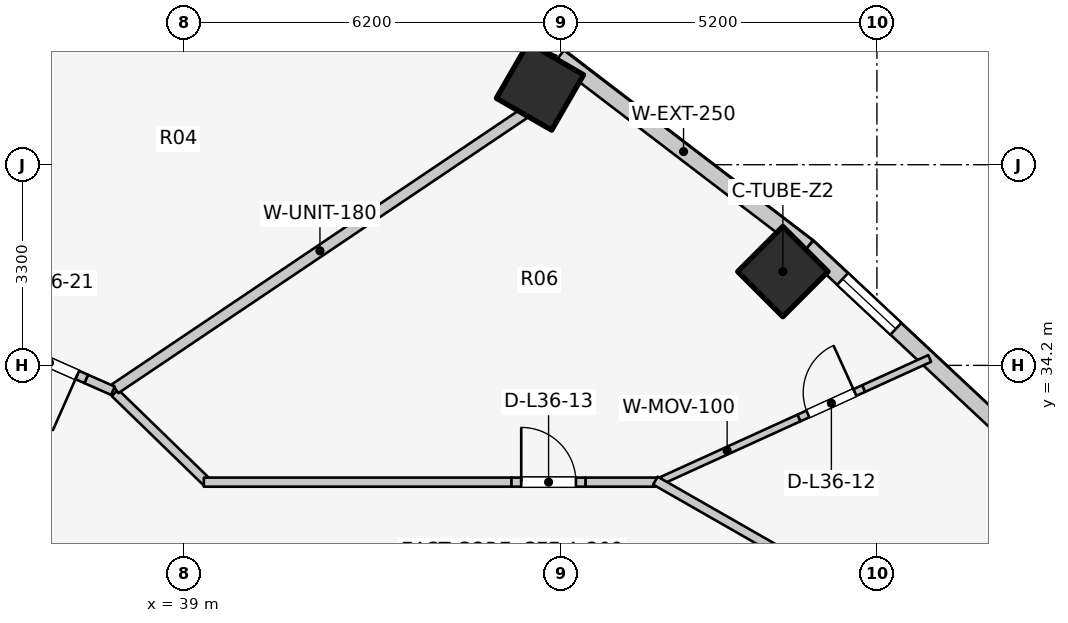
"""IFC4 building model, lengths in metres.
Left out: names, types, materials, properties, quantities, classifications, styles, units other than length and angle.
Written with IfcOpenShell. Run it as: python <this file> out.ifc"""

import sys

from ifc_helpers import new_model, si_unit, direction, frame, frame_2d, origin, origin_2d, place, context, subcontext, project, spatial, rectangle, extrude, element, fill, save


model = new_model("IFC4")
c1 = context("Model", 3, precision=1e-05, world=origin(), true_north=direction((0.0, 1.0)))
c2 = subcontext(c1, "Body", "Model", "MODEL_VIEW")
j1 = project(units=[si_unit("LENGTHUNIT", "METRE"), si_unit("PLANEANGLEUNIT", "RADIAN")], contexts=[c1])
p1 = place(None, origin())
s1 = spatial("IfcSite", under=j1, at=p1, CompositionType="ELEMENT")
p2 = place(p1, origin())
s2 = spatial("IfcBuilding", under=s1, at=p2, CompositionType="ELEMENT")
p3 = place(p2, frame((0.0, 0.0, 119.7)))
s3 = spatial("IfcBuildingStorey", under=s2, at=p3, CompositionType="ELEMENT", Elevation=119.7)
for number, where, z_axis, x_axis in (
    (1, (48.853, 35.743, 0.0), (0.0, 0.0, 1.0), (0.707, 0.707, 0.0)),
    (2, (44.858, 38.786, 0.0), (0.0, 0.0, 1.0), (0.5, 0.866, 0.0)),
):
    element("IfcColumn", number, at=place(p3, frame(where, z_axis=z_axis, x_axis=x_axis)), inside=s3, PredefinedType="COLUMN", context=c2, shape_type="SweptSolid", body=[
        extrude(rectangle(XDim=1.05, YDim=1.05, at=origin_2d()), origin(), (0.0, 0.0, 1.0), 3.1),
    ])
p4 = place(p3, frame((52.821, 32.827, 0.0), z_axis=(0.0, 0.0, 1.0), x_axis=(-0.730162452258, 0.68327358599, 0.0)))
e3 = element("IfcWall", 3, at=p4, inside=s3, PredefinedType="STANDARD", context=c2, shape_type="SweptSolid", body=[
    extrude(rectangle(XDim=4.868, YDim=0.26, at=frame_2d((2.434, 0.0))), origin(), (0.0, 0.0, 1.0), 1.22),
])
p5 = place(p4, frame((2.889, 0.0, 0.15)))
e4 = element("IfcOpeningElement", 4, at=p5, cuts=e3, PredefinedType="OPENING", context=c2, shape_type="SweptSolid", body=[
    extrude(rectangle(XDim=1.2, YDim=0.9, at=frame_2d((0.6, 0.45))), frame((0.0, 0.14, 0.0), z_axis=(0.0, -1.0, 0.0), x_axis=(1.0, 0.0, 0.0)), (0.0, 0.0, 1.0), 0.28),
])
p6 = place(p3, frame((49.266, 36.153, 0.0), z_axis=(0.0, 0.0, 1.0), x_axis=(-0.794809810864, 0.606858603427, 0.0)))
e5 = element("IfcWall", 5, at=p6, inside=s3, PredefinedType="STANDARD", context=c2, shape_type="SweptSolid", body=[
    extrude(rectangle(XDim=5.149, YDim=0.26, at=frame_2d((2.575, 0.0))), origin(), (0.0, 0.0, 1.0), 1.22),
])
p7 = place(p3, frame((46.754, 32.259, 0.0), z_axis=(0.0, 0.0, 1.0), x_axis=(0.910131348923, 0.414319837453, 0.0)))
e6 = element("IfcWall", 6, at=p7, inside=s3, PredefinedType="MOVABLE", context=c2, shape_type="SweptSolid", body=[
    extrude(rectangle(XDim=2.597, YDim=0.12, at=frame_2d((1.299, 0.0))), origin(), (0.0, 0.0, 1.0), 1.22),
])
p8 = place(p3, frame((49.118, 33.335, 0.0), z_axis=(0.0, 0.0, 1.0), x_axis=(0.910109068125, 0.414368777922, 0.0)))
e7 = element("IfcWall", 7, at=p8, inside=s3, PredefinedType="MOVABLE", context=c2, shape_type="SweptSolid", body=[
    extrude(rectangle(XDim=1.17, YDim=0.12, at=frame_2d((0.585, 0.0))), origin(), (0.0, 0.0, 1.0), 2.11),
])
p9 = place(p8, frame((0.16, 0.0, 0.0)))
e8 = element("IfcOpeningElement", 8, at=p9, cuts=e7, PredefinedType="OPENING", context=c2, shape_type="SweptSolid", body=[
    extrude(rectangle(XDim=0.85, YDim=2.05, at=frame_2d((0.425, 1.025))), frame((0.0, 0.07, 0.0), z_axis=(0.0, -1.0, 0.0), x_axis=(1.0, 0.0, 0.0)), (0.0, 0.0, 1.0), 0.14),
])
p10 = place(p3, frame((50.183, 33.82, 0.0), z_axis=(0.0, 0.0, 1.0), x_axis=(0.910190844067, 0.414189120301, 0.0)))
e9 = element("IfcWall", 9, at=p10, inside=s3, PredefinedType="MOVABLE", context=c2, shape_type="SweptSolid", body=[
    extrude(rectangle(XDim=1.191, YDim=0.12, at=frame_2d((0.595, 0.0))), origin(), (0.0, 0.0, 1.0), 2.575),
])
p11 = place(p3, frame((37.867, 33.749, 0.0), z_axis=(0.0, 0.0, 1.0), x_axis=(0.717419568599, -0.696641344302, 0.0)))
e10 = element("IfcWall", 10, at=p11, inside=s3, PredefinedType="PARTITIONING", context=c2, shape_type="SweptSolid", body=[
    extrude(rectangle(XDim=2.138, YDim=0.15, at=frame_2d((1.069, 0.0))), origin(), (0.0, 0.0, 1.0), 1.22),
])
p12 = place(p3, frame((39.33, 32.28, 0.0), z_axis=(0.0, 0.0, 1.0), x_axis=(1.0, 0.0, 0.0)))
e11 = element("IfcWall", 11, at=p12, inside=s3, PredefinedType="PARTITIONING", context=c2, shape_type="SweptSolid", body=[
    extrude(rectangle(XDim=5.06, YDim=0.15, at=frame_2d((2.53, 0.0))), origin(), (0.0, 0.0, 1.0), 1.22),
])
p13 = place(p3, frame((44.39, 32.28, 0.0), z_axis=(0.0, 0.0, 1.0), x_axis=(1.0, 0.0, 0.0)))
e12 = element("IfcWall", 12, at=p13, inside=s3, PredefinedType="PARTITIONING", context=c2, shape_type="SweptSolid", body=[
    extrude(rectangle(XDim=1.22, YDim=0.15, at=frame_2d((0.61, 0.0))), origin(), (0.0, 0.0, 1.0), 2.575),
])
p14 = place(p13, frame((0.16, 0.0, 0.0)))
e13 = element("IfcOpeningElement", 13, at=p14, cuts=e12, PredefinedType="OPENING", context=c2, shape_type="SweptSolid", body=[
    extrude(rectangle(XDim=0.9, YDim=2.1, at=frame_2d((0.45, 1.05))), frame((0.0, 0.085, 0.0), z_axis=(0.0, -1.0, 0.0), x_axis=(1.0, 0.0, 0.0)), (0.0, 0.0, 1.0), 0.17),
])
p15 = place(p3, frame((45.61, 32.28, 0.0), z_axis=(0.0, 0.0, 1.0), x_axis=(1.0, 0.0, 0.0)))
e14 = element("IfcWall", 14, at=p15, inside=s3, PredefinedType="PARTITIONING", context=c2, shape_type="SweptSolid", body=[
    extrude(rectangle(XDim=1.24, YDim=0.15, at=frame_2d((0.62, 0.0))), origin(), (0.0, 0.0, 1.0), 2.575),
])
p16 = place(p3, frame((46.757, 32.305, 0.0), z_axis=(0.0, 0.0, 1.0), x_axis=(0.867991349648, -0.496579315857, 0.0)))
e15 = element("IfcWall", 15, at=p16, inside=s3, PredefinedType="PARTITIONING", context=c2, shape_type="SweptSolid", body=[
    extrude(rectangle(XDim=2.567, YDim=0.15, at=frame_2d((1.283, 0.0))), origin(), (0.0, 0.0, 1.0), 1.22),
])
p17 = place(p3, frame((37.874, 33.818, 0.0), z_axis=(0.0, 0.0, 1.0), x_axis=(0.829603023521, 0.558353672295, 0.0)))
e16 = element("IfcWall", 16, at=p17, inside=s3, PredefinedType="PARTITIONING", context=c2, shape_type="SweptSolid", body=[
    extrude(rectangle(XDim=8.115, YDim=0.18, at=frame_2d((4.058, 0.0))), origin(), (0.0, 0.0, 1.0), 1.22),
])
p18 = place(p3, frame((37.835, 33.783, 0.0), z_axis=(0.0, 0.0, 1.0), x_axis=(-0.914564252461, 0.404440636088, 0.0)))
e17 = element("IfcWall", 17, at=p18, inside=s3, PredefinedType="PARTITIONING", context=c2, shape_type="SweptSolid", body=[
    extrude(rectangle(XDim=0.48, YDim=0.15, at=frame_2d((0.24, 0.0))), origin(), (0.0, 0.0, 1.0), 2.575),
])
p19 = place(p3, frame((37.396, 33.977, 0.0), z_axis=(0.0, 0.0, 1.0), x_axis=(-0.914352324799, 0.404919530444, 0.0)))
e18 = element("IfcWall", 18, at=p19, inside=s3, PredefinedType="PARTITIONING", context=c2, shape_type="SweptSolid", body=[
    extrude(rectangle(XDim=1.32, YDim=0.15, at=frame_2d((0.66, 0.0))), origin(), (0.0, 0.0, 1.0), 2.16),
])
p20 = place(p19, frame((0.16, 0.0, 0.0)))
e19 = element("IfcOpeningElement", 19, at=p20, cuts=e18, PredefinedType="OPENING", context=c2, shape_type="SweptSolid", body=[
    extrude(rectangle(XDim=1.0, YDim=2.1, at=frame_2d((0.5, 1.05))), frame((0.0, 0.085, 0.0), z_axis=(0.0, -1.0, 0.0), x_axis=(1.0, 0.0, 0.0)), (0.0, 0.0, 1.0), 0.17),
])
p21 = place(p5, origin())
e20 = element("IfcWindow", 20, at=p21, inside=s3, PartitioningType="SINGLE_PANEL", PredefinedType="WINDOW", context=c2, shape_type="SweptSolid", body=[
    extrude(rectangle(XDim=1.2, YDim=0.9, at=frame_2d((0.6, 0.45))), frame((0.0, 0.03, 0.0), z_axis=(0.0, -1.0, 0.0), x_axis=(1.0, 0.0, 0.0)), (0.0, 0.0, 1.0), 0.06),
])
fill(e4, e20)
p22 = place(p9, origin())
e21 = element("IfcDoor", 21, at=p22, inside=s3, OperationType="SINGLE_SWING_RIGHT", PredefinedType="DOOR", context=c2, shape_type="SweptSolid", body=[
    extrude(rectangle(XDim=0.85, YDim=2.05, at=frame_2d((0.425, 1.025))), frame((0.0, 0.025, 0.0), z_axis=(0.0, -1.0, 0.0), x_axis=(1.0, 0.0, 0.0)), (0.0, 0.0, 1.0), 0.05),
])
fill(e8, e21)
p23 = place(p14, origin())
e22 = element("IfcDoor", 22, at=p23, inside=s3, OperationType="SINGLE_SWING_LEFT", PredefinedType="DOOR", context=c2, shape_type="SweptSolid", body=[
    extrude(rectangle(XDim=0.9, YDim=2.1, at=frame_2d((0.45, 1.05))), frame((0.0, 0.025, 0.0), z_axis=(0.0, -1.0, 0.0), x_axis=(1.0, 0.0, 0.0)), (0.0, 0.0, 1.0), 0.05),
])
fill(e13, e22)
p24 = place(p20, origin())
e23 = element("IfcDoor", 23, at=p24, inside=s3, OperationType="SINGLE_SWING_LEFT", PredefinedType="DOOR", context=c2, shape_type="SweptSolid", body=[
    extrude(rectangle(XDim=1.0, YDim=2.1, at=frame_2d((0.5, 1.05))), frame((0.0, 0.025, 0.0), z_axis=(0.0, -1.0, 0.0), x_axis=(1.0, 0.0, 0.0)), (0.0, 0.0, 1.0), 0.05),
])
fill(e19, e23)
save(model, sys.argv[1])
